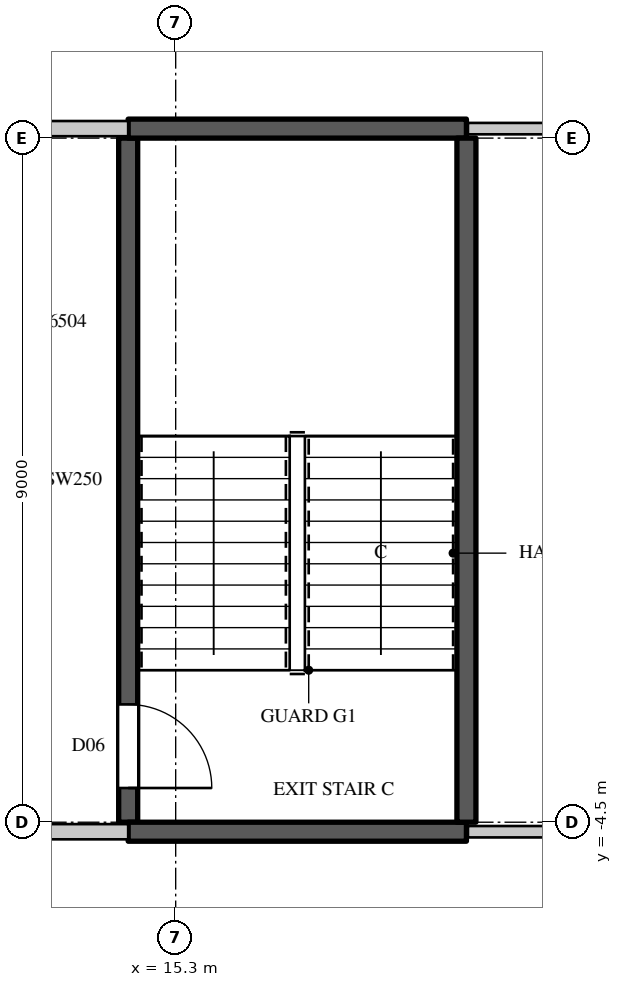
"""IFC4 building model, lengths in metres.
Left out: names, types, materials, properties, quantities, classifications, styles, units other than length and angle.
Written with IfcOpenShell. Run it as: python <this file> out.ifc"""

import sys

from ifc_helpers import new_model, si_unit, direction, frame, frame_2d, origin, place, context, subcontext, project, spatial, rectangle, extrude, element, fill, save


model = new_model("IFC4")
c1 = context("Model", 3, precision=1e-05, world=origin(), true_north=direction((0.0, 1.0)))
c2 = subcontext(c1, "Body", "Model", "MODEL_VIEW")
j1 = project(units=[si_unit("LENGTHUNIT", "METRE"), si_unit("PLANEANGLEUNIT", "RADIAN")], contexts=[c1])
p1 = place(None, origin())
s1 = spatial("IfcSite", under=j1, at=p1, CompositionType="ELEMENT")
p2 = place(p1, origin())
s2 = spatial("IfcBuilding", under=s1, at=p2, CompositionType="ELEMENT")
p3 = place(p2, frame((0.0, 0.0, 288.5)))
s3 = spatial("IfcBuildingStorey", under=s2, at=p3, CompositionType="ELEMENT", Elevation=288.5)
for number, where, z_axis, x_axis in (
    (1, (11.1, -4.625, 0.0), (0.0, 0.0, 1.0), (1.0, 0.0, 0.0)),
    (2, (11.1, 4.625, 0.0), (0.0, 0.0, 1.0), (1.0, 0.0, 0.0)),
):
    element("IfcWall", number, at=place(p3, frame(where, z_axis=z_axis, x_axis=x_axis)), inside=s3, PredefinedType="PARTITIONING", context=c2, shape_type="SweptSolid", body=[
        extrude(rectangle(XDim=3.575, YDim=0.2, at=frame_2d((1.788, 0.0))), origin(), (0.0, 0.0, 1.0), 3.8),
    ])
for number, where, z_axis, x_axis in (
    (3, (19.145, -4.625, 0.0), (0.0, 0.0, 1.0), (1.0, 0.0, 0.0)),
    (4, (19.145, 4.625, 0.0), (0.0, 0.0, 1.0), (1.0, 0.0, 0.0)),
):
    element("IfcWall", number, at=place(p3, frame(where, z_axis=z_axis, x_axis=x_axis)), inside=s3, PredefinedType="PARTITIONING", context=c2, shape_type="SweptSolid", body=[
        extrude(rectangle(XDim=4.605, YDim=0.15, at=frame_2d((2.302, 0.0))), origin(), (0.0, 0.0, 1.0), 3.8),
    ])
p4 = place(p3, frame((14.675, -4.5, 0.0), z_axis=(0.0, 0.0, 1.0), x_axis=(0.0, 1.0, 0.0)))
e5 = element("IfcWall", 5, at=p4, inside=s3, PredefinedType="SHEAR", context=c2, shape_type="SweptSolid", body=[
    extrude(rectangle(XDim=9.0, YDim=0.25, at=frame_2d((4.5, 0.0))), origin(), (0.0, 0.0, 1.0), 3.8),
])
p5 = place(p4, frame((0.45, 0.0, 0.0)))
e6 = element("IfcOpeningElement", 6, at=p5, cuts=e5, PredefinedType="OPENING", context=c2, shape_type="SweptSolid", body=[
    extrude(rectangle(XDim=1.1, YDim=2.2, at=frame_2d((0.55, 1.1))), frame((0.0, 0.135, 0.0), z_axis=(0.0, -1.0, 0.0), x_axis=(1.0, 0.0, 0.0)), (0.0, 0.0, 1.0), 0.27),
])
for number, where, z_axis, x_axis in (
    (7, (14.675, -4.625, 0.0), (0.0, 0.0, 1.0), (1.0, 0.0, 0.0)),
    (8, (14.675, 4.625, 0.0), (0.0, 0.0, 1.0), (1.0, 0.0, 0.0)),
):
    element("IfcWall", number, at=place(p3, frame(where, z_axis=z_axis, x_axis=x_axis)), inside=s3, PredefinedType="SHEAR", context=c2, shape_type="SweptSolid", body=[
        extrude(rectangle(XDim=4.45, YDim=0.25, at=frame_2d((2.225, 0.0))), origin(), (0.0, 0.0, 1.0), 3.8),
    ])
p6 = place(p3, frame((19.125, -4.5, 0.0), z_axis=(0.0, 0.0, 1.0), x_axis=(0.0, 1.0, 0.0)))
e9 = element("IfcWall", 9, at=p6, inside=s3, PredefinedType="SHEAR", context=c2, shape_type="SweptSolid", body=[
    extrude(rectangle(XDim=9.0, YDim=0.25, at=frame_2d((4.5, 0.0))), origin(), (0.0, 0.0, 1.0), 3.8),
])
p7 = place(p5, origin())
e10 = element("IfcDoor", 10, at=p7, inside=s3, OperationType="SINGLE_SWING_RIGHT", PredefinedType="DOOR", context=c2, shape_type="SweptSolid", body=[
    extrude(rectangle(XDim=1.1, YDim=2.2, at=frame_2d((0.55, 1.1))), frame((0.0, 0.025, 0.0), z_axis=(0.0, -1.0, 0.0), x_axis=(1.0, 0.0, 0.0)), (0.0, 0.0, 1.0), 0.05),
])
fill(e6, e10)
save(model, sys.argv[1])
